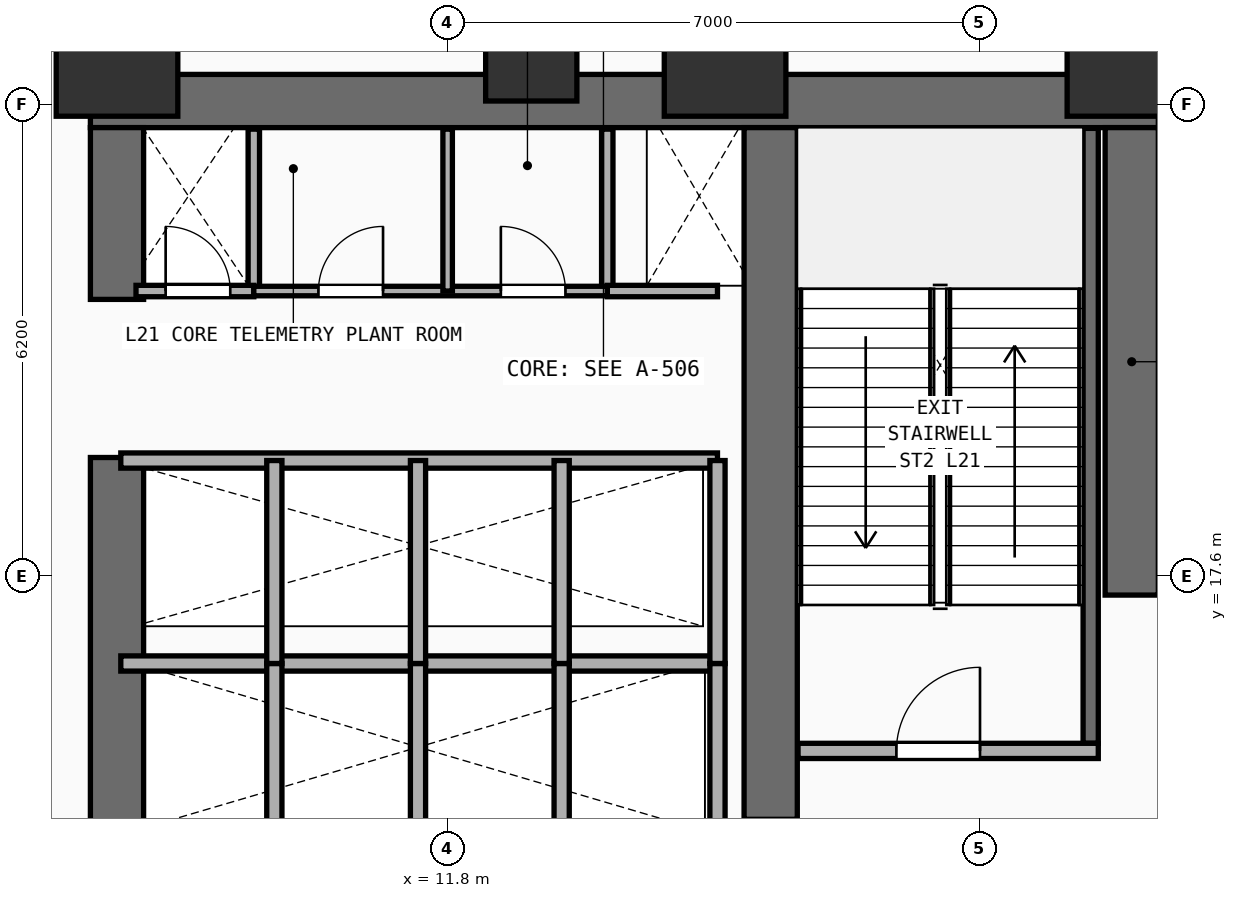
"""IFC4 building model, lengths in metres.
Left out: names, types, materials, properties, quantities, classifications, styles, units other than length and angle.
Written with IfcOpenShell. Run it as: python <this file> out.ifc"""

import sys

from ifc_helpers import new_model, si_unit, direction, frame, frame_2d, origin, origin_2d, place, context, subcontext, project, spatial, rectangle, extrude, element, fill, save


model = new_model("IFC4")
c1 = context("Model", 3, precision=1e-05, world=origin(), true_north=direction((0.0, 1.0)))
c2 = subcontext(c1, "Body", "Model", "MODEL_VIEW")
j1 = project(units=[si_unit("LENGTHUNIT", "METRE"), si_unit("PLANEANGLEUNIT", "RADIAN")], contexts=[c1])
p1 = place(None, origin())
s1 = spatial("IfcSite", under=j1, at=p1, CompositionType="ELEMENT")
p2 = place(p1, origin())
s2 = spatial("IfcBuilding", under=s1, at=p2, CompositionType="ELEMENT")
p3 = place(p2, frame((0.0, 0.0, 82.8)))
s3 = spatial("IfcBuildingStorey", under=s2, at=p3, CompositionType="ELEMENT", Elevation=82.8)
p4 = place(p3, frame((7.1, 23.85, 0.0), z_axis=(0.0, 0.0, 1.0), x_axis=(1.0, 0.0, 0.0)))
e1 = element("IfcWall", 1, at=p4, inside=s3, PredefinedType="SHEAR", context=c2, shape_type="SweptSolid", body=[
    extrude(rectangle(XDim=14.05, YDim=0.7, at=frame_2d((7.025, 0.0))), origin(), (0.0, 0.0, 1.0), 4.84),
])
p5 = place(p3, frame((7.45, 14.35, 0.0), z_axis=(0.0, 0.0, 1.0), x_axis=(0.0, 1.0, 0.0)))
e2 = element("IfcWall", 2, at=p5, inside=s3, PredefinedType="SHEAR", context=c2, shape_type="SweptSolid", body=[
    extrude(rectangle(XDim=4.81, YDim=0.7, at=frame_2d((2.405, 0.0))), origin(), (0.0, 0.0, 1.0), 4.84),
])
p6 = place(p3, frame((7.45, 21.24, 0.0), z_axis=(0.0, 0.0, 1.0), x_axis=(0.0, 1.0, 0.0)))
e3 = element("IfcWall", 3, at=p6, inside=s3, PredefinedType="SHEAR", context=c2, shape_type="SweptSolid", body=[
    extrude(rectangle(XDim=2.26, YDim=0.7, at=frame_2d((1.13, 0.0))), origin(), (0.0, 0.0, 1.0), 4.84),
])
p7 = place(p3, frame((20.8, 17.35, 0.0), z_axis=(0.0, 0.0, 1.0), x_axis=(0.0, 1.0, 0.0)))
e4 = element("IfcWall", 4, at=p7, inside=s3, PredefinedType="SHEAR", context=c2, shape_type="SweptSolid", body=[
    extrude(rectangle(XDim=6.15, YDim=0.7, at=frame_2d((3.075, 0.0))), origin(), (0.0, 0.0, 1.0), 4.84),
])
p8 = place(p3, frame((16.05, 14.4, 0.0), z_axis=(0.0, 0.0, 1.0), x_axis=(0.0, 1.0, 0.0)))
e5 = element("IfcWall", 5, at=p8, inside=s3, PredefinedType="SHEAR", context=c2, shape_type="SweptSolid", body=[
    extrude(rectangle(XDim=9.1, YDim=0.7, at=frame_2d((4.55, 0.0))), origin(), (0.0, 0.0, 1.0), 4.84),
])
for number, where, z_axis, x_axis in (
    (6, (7.45, 24.45, 0.0), (0.0, 0.0, 1.0), (1.0, 0.0, 0.0)),
    (7, (15.45, 24.45, 0.0), (0.0, 0.0, 1.0), (1.0, 0.0, 0.0)),
    (8, (20.75, 24.45, 0.0), (0.0, 0.0, 1.0), (1.0, 0.0, 0.0)),
):
    element("IfcColumn", number, at=place(p3, frame(where, z_axis=z_axis, x_axis=x_axis)), inside=s3, PredefinedType="COLUMN", context=c2, shape_type="SweptSolid", body=[
        extrude(rectangle(XDim=1.6, YDim=1.6, at=origin_2d()), origin(), (0.0, 0.0, 1.0), 4.84),
    ])
p9 = place(p3, frame((12.9, 24.45, 0.0), z_axis=(0.0, 0.0, 1.0), x_axis=(1.0, 0.0, 0.0)))
e9 = element("IfcColumn", 9, at=p9, inside=s3, PredefinedType="COLUMN", context=c2, shape_type="SweptSolid", body=[
    extrude(rectangle(XDim=1.2, YDim=1.2, at=origin_2d()), origin(), (0.0, 0.0, 1.0), 4.84),
])
p10 = place(p3, frame((20.26, 15.4, 0.0), z_axis=(0.0, 0.0, 1.0), x_axis=(0.0, 1.0, 0.0)))
e10 = element("IfcWall", 10, at=p10, inside=s3, PredefinedType="SHEAR", context=c2, shape_type="SweptSolid", body=[
    extrude(rectangle(XDim=8.09, YDim=0.2, at=frame_2d((4.045, 0.0))), origin(), (0.0, 0.0, 1.0), 4.84),
])
p11 = place(p3, frame((16.41, 15.3, 0.0), z_axis=(0.0, 0.0, 1.0), x_axis=(1.0, 0.0, 0.0)))
e11 = element("IfcWall", 11, at=p11, inside=s3, PredefinedType="PARTITIONING", context=c2, shape_type="SweptSolid", body=[
    extrude(rectangle(XDim=3.95, YDim=0.2, at=frame_2d((1.975, 0.0))), origin(), (0.0, 0.0, 1.0), 4.84),
])
p12 = place(p11, frame((1.294, 0.0, 0.0)))
e12 = element("IfcOpeningElement", 12, at=p12, cuts=e11, PredefinedType="OPENING", context=c2, shape_type="SweptSolid", body=[
    extrude(rectangle(XDim=1.1, YDim=2.2, at=frame_2d((0.55, 1.1))), frame((0.0, 0.11, 0.0), z_axis=(0.0, -1.0, 0.0), x_axis=(1.0, 0.0, 0.0)), (0.0, 0.0, 1.0), 0.22),
])
p13 = place(p3, frame((7.5, 16.45, 0.0), z_axis=(0.0, 0.0, 1.0), x_axis=(1.0, 0.0, 0.0)))
e13 = element("IfcWall", 13, at=p13, inside=s3, PredefinedType="PARTITIONING", context=c2, shape_type="SweptSolid", body=[
    extrude(rectangle(XDim=7.85, YDim=0.2, at=frame_2d((3.925, 0.0))), origin(), (0.0, 0.0, 1.0), 4.84),
])
for number, where, z_axis, x_axis in (
    (14, (15.35, 14.22, 0.0), (0.0, 0.0, 1.0), (0.0, 1.0, 0.0)),
    (15, (9.52, 14.22, 0.0), (0.0, 0.0, 1.0), (0.0, 1.0, 0.0)),
    (16, (11.41, 14.22, 0.0), (0.0, 0.0, 1.0), (0.0, 1.0, 0.0)),
    (17, (13.3, 14.22, 0.0), (0.0, 0.0, 1.0), (0.0, 1.0, 0.0)),
):
    element("IfcWall", number, at=place(p3, frame(where, z_axis=z_axis, x_axis=x_axis)), inside=s3, PredefinedType="PARTITIONING", context=c2, shape_type="SweptSolid", body=[
        extrude(rectangle(XDim=2.23, YDim=0.2, at=frame_2d((1.115, 0.0))), origin(), (0.0, 0.0, 1.0), 4.84),
    ])
p14 = place(p3, frame((7.5, 19.12, 0.0), z_axis=(0.0, 0.0, 1.0), x_axis=(1.0, 0.0, 0.0)))
e18 = element("IfcWall", 18, at=p14, inside=s3, PredefinedType="PARTITIONING", context=c2, shape_type="SweptSolid", body=[
    extrude(rectangle(XDim=7.85, YDim=0.2, at=frame_2d((3.925, 0.0))), origin(), (0.0, 0.0, 1.0), 4.84),
])
for number, where, z_axis, x_axis in (
    (19, (15.35, 16.45, 0.0), (0.0, 0.0, 1.0), (0.0, 1.0, 0.0)),
    (20, (9.52, 16.45, 0.0), (0.0, 0.0, 1.0), (0.0, 1.0, 0.0)),
    (21, (11.41, 16.45, 0.0), (0.0, 0.0, 1.0), (0.0, 1.0, 0.0)),
    (22, (13.3, 16.45, 0.0), (0.0, 0.0, 1.0), (0.0, 1.0, 0.0)),
):
    element("IfcWall", number, at=place(p3, frame(where, z_axis=z_axis, x_axis=x_axis)), inside=s3, PredefinedType="PARTITIONING", context=c2, shape_type="SweptSolid", body=[
        extrude(rectangle(XDim=2.67, YDim=0.2, at=frame_2d((1.335, 0.0))), origin(), (0.0, 0.0, 1.0), 4.84),
    ])
for number, where, z_axis, x_axis in (
    (23, (9.25, 21.35, 0.0), (0.0, 0.0, 1.0), (0.0, 1.0, 0.0)),
    (24, (13.9, 21.35, 0.0), (0.0, 0.0, 1.0), (0.0, 1.0, 0.0)),
):
    element("IfcWall", number, at=place(p3, frame(where, z_axis=z_axis, x_axis=x_axis)), inside=s3, PredefinedType="PARTITIONING", context=c2, shape_type="SweptSolid", body=[
        extrude(rectangle(XDim=2.13, YDim=0.15, at=frame_2d((1.065, 0.0))), origin(), (0.0, 0.0, 1.0), 4.84),
    ])
p15 = place(p3, frame((7.7, 21.35, 0.0), z_axis=(0.0, 0.0, 1.0), x_axis=(1.0, 0.0, 0.0)))
e25 = element("IfcWall", 25, at=p15, inside=s3, PredefinedType="PARTITIONING", context=c2, shape_type="SweptSolid", body=[
    extrude(rectangle(XDim=1.55, YDim=0.15, at=frame_2d((0.775, 0.0))), origin(), (0.0, 0.0, 1.0), 4.84),
])
p16 = place(p15, frame((0.39, 0.0, 0.0)))
e26 = element("IfcOpeningElement", 26, at=p16, cuts=e25, PredefinedType="OPENING", context=c2, shape_type="SweptSolid", body=[
    extrude(rectangle(XDim=0.85, YDim=2.15, at=frame_2d((0.425, 1.075))), frame((0.0, 0.085, 0.0), z_axis=(0.0, -1.0, 0.0), x_axis=(1.0, 0.0, 0.0)), (0.0, 0.0, 1.0), 0.17),
])
p17 = place(p3, frame((13.9, 21.35, 0.0), z_axis=(0.0, 0.0, 1.0), x_axis=(1.0, 0.0, 0.0)))
e27 = element("IfcWall", 27, at=p17, inside=s3, PredefinedType="PARTITIONING", context=c2, shape_type="SweptSolid", body=[
    extrude(rectangle(XDim=1.45, YDim=0.15, at=frame_2d((0.725, 0.0))), origin(), (0.0, 0.0, 1.0), 4.84),
])
p18 = place(p3, frame((9.25, 21.35, 0.0), z_axis=(0.0, 0.0, 1.0), x_axis=(1.0, 0.0, 0.0)))
e28 = element("IfcWall", 28, at=p18, inside=s3, PredefinedType="PARTITIONING", context=c2, shape_type="SweptSolid", body=[
    extrude(rectangle(XDim=4.65, YDim=0.125, at=frame_2d((2.325, 0.0))), origin(), (0.0, 0.0, 1.0), 4.84),
])
p19 = place(p18, frame((0.85, 0.0, 0.0)))
e29 = element("IfcOpeningElement", 29, at=p19, cuts=e28, PredefinedType="OPENING", context=c2, shape_type="SweptSolid", body=[
    extrude(rectangle(XDim=0.85, YDim=2.15, at=frame_2d((0.425, 1.075))), frame((0.0, 0.073, 0.0), z_axis=(0.0, -1.0, 0.0), x_axis=(1.0, 0.0, 0.0)), (0.0, 0.0, 1.0), 0.145),
])
p20 = place(p18, frame((3.25, 0.0, 0.0)))
e30 = element("IfcOpeningElement", 30, at=p20, cuts=e28, PredefinedType="OPENING", context=c2, shape_type="SweptSolid", body=[
    extrude(rectangle(XDim=0.85, YDim=2.15, at=frame_2d((0.425, 1.075))), frame((0.0, 0.073, 0.0), z_axis=(0.0, -1.0, 0.0), x_axis=(1.0, 0.0, 0.0)), (0.0, 0.0, 1.0), 0.145),
])
p21 = place(p3, frame((11.8, 21.35, 0.0), z_axis=(0.0, 0.0, 1.0), x_axis=(0.0, 1.0, 0.0)))
e31 = element("IfcWall", 31, at=p21, inside=s3, PredefinedType="PARTITIONING", context=c2, shape_type="SweptSolid", body=[
    extrude(rectangle(XDim=2.13, YDim=0.125, at=frame_2d((1.065, 0.0))), origin(), (0.0, 0.0, 1.0), 4.84),
])
p22 = place(p12, origin())
e32 = element("IfcDoor", 32, at=p22, inside=s3, OperationType="SINGLE_SWING_RIGHT", PredefinedType="DOOR", context=c2, shape_type="SweptSolid", body=[
    extrude(rectangle(XDim=1.1, YDim=2.2, at=frame_2d((0.55, 1.1))), frame((0.0, 0.025, 0.0), z_axis=(0.0, -1.0, 0.0), x_axis=(1.0, 0.0, 0.0)), (0.0, 0.0, 1.0), 0.05),
])
fill(e12, e32)
p23 = place(p16, origin())
e33 = element("IfcDoor", 33, at=p23, inside=s3, OperationType="SINGLE_SWING_LEFT", PredefinedType="DOOR", context=c2, shape_type="SweptSolid", body=[
    extrude(rectangle(XDim=0.85, YDim=2.15, at=frame_2d((0.425, 1.075))), frame((0.0, 0.025, 0.0), z_axis=(0.0, -1.0, 0.0), x_axis=(1.0, 0.0, 0.0)), (0.0, 0.0, 1.0), 0.05),
])
fill(e26, e33)
p24 = place(p19, origin())
e34 = element("IfcDoor", 34, at=p24, inside=s3, OperationType="SINGLE_SWING_RIGHT", PredefinedType="DOOR", context=c2, shape_type="SweptSolid", body=[
    extrude(rectangle(XDim=0.85, YDim=2.15, at=frame_2d((0.425, 1.075))), frame((0.0, 0.025, 0.0), z_axis=(0.0, -1.0, 0.0), x_axis=(1.0, 0.0, 0.0)), (0.0, 0.0, 1.0), 0.05),
])
fill(e29, e34)
p25 = place(p20, origin())
e35 = element("IfcDoor", 35, at=p25, inside=s3, OperationType="SINGLE_SWING_LEFT", PredefinedType="DOOR", context=c2, shape_type="SweptSolid", body=[
    extrude(rectangle(XDim=0.85, YDim=2.15, at=frame_2d((0.425, 1.075))), frame((0.0, 0.025, 0.0), z_axis=(0.0, -1.0, 0.0), x_axis=(1.0, 0.0, 0.0)), (0.0, 0.0, 1.0), 0.05),
])
fill(e30, e35)
save(model, sys.argv[1])
